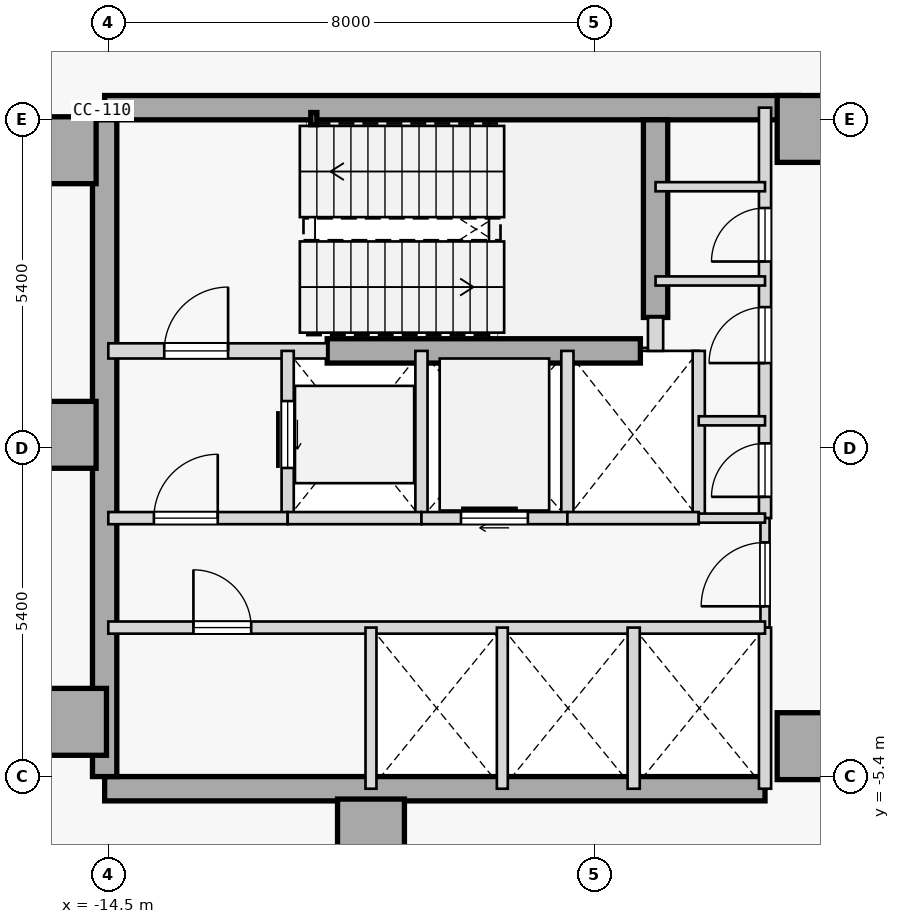
"""IFC4 building model, lengths in metres.
Left out: names, types, materials, properties, quantities, classifications, styles, units other than length and angle.
Written with IfcOpenShell. Run it as: python <this file> out.ifc"""

import sys

from ifc_helpers import new_model, si_unit, direction, frame, frame_2d, origin, origin_2d, place, context, subcontext, project, spatial, rectangle, hollow_rectangle, extrude, element, fill, save


model = new_model("IFC4")
c1 = context("Model", 3, precision=1e-05, world=origin(), true_north=direction((0.0, 1.0)))
c2 = subcontext(c1, "Body", "Model", "MODEL_VIEW")
j1 = project(units=[si_unit("LENGTHUNIT", "METRE"), si_unit("PLANEANGLEUNIT", "RADIAN")], contexts=[c1])
p1 = place(None, origin())
s1 = spatial("IfcSite", under=j1, at=p1, CompositionType="ELEMENT")
p2 = place(p1, origin())
s2 = spatial("IfcBuilding", under=s1, at=p2, CompositionType="ELEMENT")
p3 = place(p2, frame((0.0, 0.0, 202.4)))
s3 = spatial("IfcBuildingStorey", under=s2, at=p3, CompositionType="ELEMENT", Elevation=202.4)
for number, where, z_axis, x_axis in (
    (1, (-15.25, 4.9, 0.0), (0.0, 0.0, 1.0), (1.0, 0.0, 0.0)),
    (2, (-15.25, 0.22, 0.0), (0.0, 0.0, 1.0), (1.0, 0.0, 0.0)),
    (3, (-15.08, -4.5, 0.0), (0.0, 0.0, 1.0), (1.0, 0.0, 0.0)),
    (4, (-10.18, -6.32, 0.0), (0.0, 0.0, 1.0), (1.0, 0.0, 0.0)),
    (5, (-2.95, -4.9, 0.0), (0.0, 0.0, 1.0), (1.0, 0.0, 0.0)),
    (6, (-2.95, 5.25, 0.0), (0.0, 0.0, 1.0), (1.0, 0.0, 0.0)),
):
    element("IfcColumn", number, at=place(p3, frame(where, z_axis=z_axis, x_axis=x_axis)), inside=s3, PredefinedType="COLUMN", context=c2, shape_type="SweptSolid", body=[
        extrude(rectangle(XDim=1.1, YDim=1.1, at=origin_2d()), origin(), (0.0, 0.0, 1.0), 4.4),
    ])
p4 = place(p3, frame((-14.56, 5.6, 0.0), z_axis=(0.0, 0.0, 1.0), x_axis=(1.0, 0.0, 0.0)))
e7 = element("IfcWall", 7, at=p4, inside=s3, PredefinedType="SHEAR", context=c2, shape_type="SweptSolid", body=[
    extrude(rectangle(XDim=11.41, YDim=0.4, at=frame_2d((5.705, 0.0))), origin(), (0.0, 0.0, 1.0), 4.15),
])
p5 = place(p3, frame((-14.56, -5.6, 0.0), z_axis=(0.0, 0.0, 1.0), x_axis=(1.0, 0.0, 0.0)))
e8 = element("IfcWall", 8, at=p5, inside=s3, PredefinedType="SHEAR", context=c2, shape_type="SweptSolid", body=[
    extrude(rectangle(XDim=10.86, YDim=0.4, at=frame_2d((5.43, 0.0))), origin(), (0.0, 0.0, 1.0), 4.15),
])
p6 = place(p3, frame((-14.56, -5.4, 0.0), z_axis=(0.0, 0.0, 1.0), x_axis=(0.0, 1.0, 0.0)))
e9 = element("IfcWall", 9, at=p6, inside=s3, PredefinedType="SHEAR", context=c2, shape_type="SweptSolid", body=[
    extrude(rectangle(XDim=10.8, YDim=0.4, at=frame_2d((5.4, 0.0))), origin(), (0.0, 0.0, 1.0), 4.15),
])
p7 = place(p3, frame((-5.5, 2.15, 0.0), z_axis=(0.0, 0.0, 1.0), x_axis=(0.0, 1.0, 0.0)))
e10 = element("IfcWall", 10, at=p7, inside=s3, PredefinedType="SHEAR", context=c2, shape_type="SweptSolid", body=[
    extrude(rectangle(XDim=3.25, YDim=0.4, at=frame_2d((1.625, 0.0))), origin(), (0.0, 0.0, 1.0), 4.15),
])
p8 = place(p3, frame((-10.9, 1.6, 0.0), z_axis=(0.0, 0.0, 1.0), x_axis=(1.0, 0.0, 0.0)))
e11 = element("IfcWall", 11, at=p8, inside=s3, PredefinedType="SHEAR", context=c2, shape_type="SweptSolid", body=[
    extrude(rectangle(XDim=5.15, YDim=0.4, at=frame_2d((2.575, 0.0))), origin(), (0.0, 0.0, 1.0), 4.15),
])
p9 = place(p3, frame((-11.12, 5.42, 0.0), z_axis=(0.0, 0.0, 1.0), x_axis=(1.0, 0.0, 0.0)))
e12 = element("IfcColumn", 12, at=p9, inside=s3, PredefinedType="COLUMN", context=c2, shape_type="SweptSolid", body=[
    extrude(hollow_rectangle(XDim=0.1, YDim=0.2, WallThickness=0.008, at=origin_2d()), origin(), (0.0, 0.0, 1.0), 4.4),
])
p10 = place(p3, frame((-14.5, 1.6, 0.0), z_axis=(0.0, 0.0, 1.0), x_axis=(1.0, 0.0, 0.0)))
e13 = element("IfcWall", 13, at=p10, inside=s3, PredefinedType="STANDARD", context=c2, shape_type="SweptSolid", body=[
    extrude(rectangle(XDim=3.6, YDim=0.25, at=frame_2d((1.8, 0.0))), origin(), (0.0, 0.0, 1.0), 4.15),
])
p11 = place(p10, frame((0.92, 0.0, 0.0)))
e14 = element("IfcOpeningElement", 14, at=p11, cuts=e13, PredefinedType="OPENING", context=c2, shape_type="SweptSolid", body=[
    extrude(rectangle(XDim=1.05, YDim=2.15, at=frame_2d((0.525, 1.075))), frame((0.0, 0.135, 0.0), z_axis=(0.0, -1.0, 0.0), x_axis=(1.0, 0.0, 0.0)), (0.0, 0.0, 1.0), 0.27),
])
p12 = place(p3, frame((-5.5, 1.6, 0.0), z_axis=(0.0, 0.0, 1.0), x_axis=(0.0, 1.0, 0.0)))
e15 = element("IfcWall", 15, at=p12, inside=s3, PredefinedType="STANDARD", context=c2, shape_type="SweptSolid", body=[
    extrude(rectangle(XDim=0.55, YDim=0.25, at=frame_2d((0.275, 0.0))), origin(), (0.0, 0.0, 1.0), 4.15),
])
p13 = place(p3, frame((-3.7, -1.15, 0.0), z_axis=(0.0, 0.0, 1.0), x_axis=(0.0, 1.0, 0.0)))
e16 = element("IfcWall", 16, at=p13, inside=s3, PredefinedType="STANDARD", context=c2, shape_type="SweptSolid", body=[
    extrude(rectangle(XDim=6.75, YDim=0.2, at=frame_2d((3.375, 0.0))), origin(), (0.0, 0.0, 1.0), 4.15),
])
p14 = place(p13, frame((0.35, 0.0, 0.0)))
e17 = element("IfcOpeningElement", 17, at=p14, cuts=e16, PredefinedType="OPENING", context=c2, shape_type="SweptSolid", body=[
    extrude(rectangle(XDim=0.88, YDim=2.15, at=frame_2d((0.44, 1.075))), frame((0.0, 0.11, 0.0), z_axis=(0.0, -1.0, 0.0), x_axis=(1.0, 0.0, 0.0)), (0.0, 0.0, 1.0), 0.22),
])
p15 = place(p13, frame((2.55, 0.0, 0.0)))
e18 = element("IfcOpeningElement", 18, at=p15, cuts=e16, PredefinedType="OPENING", context=c2, shape_type="SweptSolid", body=[
    extrude(rectangle(XDim=0.92, YDim=2.15, at=frame_2d((0.46, 1.075))), frame((0.0, 0.11, 0.0), z_axis=(0.0, -1.0, 0.0), x_axis=(1.0, 0.0, 0.0)), (0.0, 0.0, 1.0), 0.22),
])
p16 = place(p13, frame((4.22, 0.0, 0.0)))
e19 = element("IfcOpeningElement", 19, at=p16, cuts=e16, PredefinedType="OPENING", context=c2, shape_type="SweptSolid", body=[
    extrude(rectangle(XDim=0.88, YDim=2.15, at=frame_2d((0.44, 1.075))), frame((0.0, 0.11, 0.0), z_axis=(0.0, -1.0, 0.0), x_axis=(1.0, 0.0, 0.0)), (0.0, 0.0, 1.0), 0.22),
])
p17 = place(p3, frame((-3.7, -2.95, 0.0), z_axis=(0.0, 0.0, 1.0), x_axis=(0.0, 1.0, 0.0)))
e20 = element("IfcWall", 20, at=p17, inside=s3, PredefinedType="PARTITIONING", context=c2, shape_type="SweptSolid", body=[
    extrude(rectangle(XDim=1.8, YDim=0.15, at=frame_2d((0.9, 0.0))), origin(), (0.0, 0.0, 1.0), 4.15),
])
p18 = place(p17, frame((0.35, 0.0, 0.0)))
e21 = element("IfcOpeningElement", 21, at=p18, cuts=e20, PredefinedType="OPENING", context=c2, shape_type="SweptSolid", body=[
    extrude(rectangle(XDim=1.05, YDim=2.18, at=frame_2d((0.525, 1.09))), frame((0.0, 0.085, 0.0), z_axis=(0.0, -1.0, 0.0), x_axis=(1.0, 0.0, 0.0)), (0.0, 0.0, 1.0), 0.17),
])
p19 = place(p3, frame((-3.7, -5.6, 0.0), z_axis=(0.0, 0.0, 1.0), x_axis=(0.0, 1.0, 0.0)))
e22 = element("IfcWall", 22, at=p19, inside=s3, PredefinedType="STANDARD", context=c2, shape_type="SweptSolid", body=[
    extrude(rectangle(XDim=2.65, YDim=0.2, at=frame_2d((1.325, 0.0))), origin(), (0.0, 0.0, 1.0), 4.15),
])
p20 = place(p3, frame((-11.55, -1.15, 0.0), z_axis=(0.0, 0.0, 1.0), x_axis=(0.0, 1.0, 0.0)))
e23 = element("IfcWall", 23, at=p20, inside=s3, PredefinedType="STANDARD", context=c2, shape_type="SweptSolid", body=[
    extrude(rectangle(XDim=2.75, YDim=0.2, at=frame_2d((1.375, 0.0))), origin(), (0.0, 0.0, 1.0), 4.15),
])
p21 = place(p20, frame((0.825, 0.0, 0.0)))
e24 = element("IfcOpeningElement", 24, at=p21, cuts=e23, PredefinedType="OPENING", context=c2, shape_type="SweptSolid", body=[
    extrude(rectangle(XDim=1.1, YDim=2.15, at=frame_2d((0.55, 1.075))), frame((0.0, 0.11, 0.0), z_axis=(0.0, -1.0, 0.0), x_axis=(1.0, 0.0, 0.0)), (0.0, 0.0, 1.0), 0.22),
])
p22 = place(p3, frame((-9.35, -1.15, 0.0), z_axis=(0.0, 0.0, 1.0), x_axis=(0.0, 1.0, 0.0)))
e25 = element("IfcWall", 25, at=p22, inside=s3, PredefinedType="STANDARD", context=c2, shape_type="SweptSolid", body=[
    extrude(rectangle(XDim=2.75, YDim=0.2, at=frame_2d((1.375, 0.0))), origin(), (0.0, 0.0, 1.0), 4.15),
])
p23 = place(p3, frame((-14.5, -1.15, 0.0), z_axis=(0.0, 0.0, 1.0), x_axis=(1.0, 0.0, 0.0)))
e26 = element("IfcWall", 26, at=p23, inside=s3, PredefinedType="STANDARD", context=c2, shape_type="SweptSolid", body=[
    extrude(rectangle(XDim=2.95, YDim=0.2, at=frame_2d((1.475, 0.0))), origin(), (0.0, 0.0, 1.0), 4.15),
])
p24 = place(p23, frame((0.75, 0.0, 0.0)))
e27 = element("IfcOpeningElement", 27, at=p24, cuts=e26, PredefinedType="OPENING", context=c2, shape_type="SweptSolid", body=[
    extrude(rectangle(XDim=1.05, YDim=2.18, at=frame_2d((0.525, 1.09))), frame((0.0, 0.11, 0.0), z_axis=(0.0, -1.0, 0.0), x_axis=(1.0, 0.0, 0.0)), (0.0, 0.0, 1.0), 0.22),
])
p25 = place(p3, frame((-11.55, -1.15, 0.0), z_axis=(0.0, 0.0, 1.0), x_axis=(1.0, 0.0, 0.0)))
e28 = element("IfcWall", 28, at=p25, inside=s3, PredefinedType="STANDARD", context=c2, shape_type="SweptSolid", body=[
    extrude(rectangle(XDim=2.2, YDim=0.2, at=frame_2d((1.1, 0.0))), origin(), (0.0, 0.0, 1.0), 4.15),
])
p26 = place(p3, frame((-6.95, -1.15, 0.0), z_axis=(0.0, 0.0, 1.0), x_axis=(0.0, 1.0, 0.0)))
e29 = element("IfcWall", 29, at=p26, inside=s3, PredefinedType="STANDARD", context=c2, shape_type="SweptSolid", body=[
    extrude(rectangle(XDim=2.75, YDim=0.2, at=frame_2d((1.375, 0.0))), origin(), (0.0, 0.0, 1.0), 4.15),
])
p27 = place(p3, frame((-9.35, -1.15, 0.0), z_axis=(0.0, 0.0, 1.0), x_axis=(1.0, 0.0, 0.0)))
e30 = element("IfcWall", 30, at=p27, inside=s3, PredefinedType="STANDARD", context=c2, shape_type="SweptSolid", body=[
    extrude(rectangle(XDim=2.4, YDim=0.2, at=frame_2d((1.2, 0.0))), origin(), (0.0, 0.0, 1.0), 4.15),
])
p28 = place(p27, frame((0.65, 0.0, 0.0)))
e31 = element("IfcOpeningElement", 31, at=p28, cuts=e30, PredefinedType="OPENING", context=c2, shape_type="SweptSolid", body=[
    extrude(rectangle(XDim=1.1, YDim=2.15, at=frame_2d((0.55, 1.075))), frame((0.0, 0.11, 0.0), z_axis=(0.0, -1.0, 0.0), x_axis=(1.0, 0.0, 0.0)), (0.0, 0.0, 1.0), 0.22),
])
p29 = place(p3, frame((-4.79, -1.15, 0.0), z_axis=(0.0, 0.0, 1.0), x_axis=(0.0, 1.0, 0.0)))
e32 = element("IfcWall", 32, at=p29, inside=s3, PredefinedType="STANDARD", context=c2, shape_type="SweptSolid", body=[
    extrude(rectangle(XDim=2.75, YDim=0.2, at=frame_2d((1.375, 0.0))), origin(), (0.0, 0.0, 1.0), 4.15),
])
p30 = place(p3, frame((-6.95, -1.15, 0.0), z_axis=(0.0, 0.0, 1.0), x_axis=(1.0, 0.0, 0.0)))
e33 = element("IfcWall", 33, at=p30, inside=s3, PredefinedType="STANDARD", context=c2, shape_type="SweptSolid", body=[
    extrude(rectangle(XDim=2.16, YDim=0.2, at=frame_2d((1.08, 0.0))), origin(), (0.0, 0.0, 1.0), 4.15),
])
p31 = place(p3, frame((-4.79, -1.15, 0.0), z_axis=(0.0, 0.0, 1.0), x_axis=(1.0, 0.0, 0.0)))
e34 = element("IfcWall", 34, at=p31, inside=s3, PredefinedType="PARTITIONING", context=c2, shape_type="SweptSolid", body=[
    extrude(rectangle(XDim=1.09, YDim=0.15, at=frame_2d((0.545, 0.0))), origin(), (0.0, 0.0, 1.0), 4.15),
])
p32 = place(p3, frame((-14.5, -2.95, 0.0), z_axis=(0.0, 0.0, 1.0), x_axis=(1.0, 0.0, 0.0)))
e35 = element("IfcWall", 35, at=p32, inside=s3, PredefinedType="STANDARD", context=c2, shape_type="SweptSolid", body=[
    extrude(rectangle(XDim=10.8, YDim=0.2, at=frame_2d((5.4, 0.0))), origin(), (0.0, 0.0, 1.0), 4.15),
])
p33 = place(p32, frame((1.4, 0.0, 0.0)))
e36 = element("IfcOpeningElement", 36, at=p33, cuts=e35, PredefinedType="OPENING", context=c2, shape_type="SweptSolid", body=[
    extrude(rectangle(XDim=0.95, YDim=2.15, at=frame_2d((0.475, 1.075))), frame((0.0, 0.11, 0.0), z_axis=(0.0, -1.0, 0.0), x_axis=(1.0, 0.0, 0.0)), (0.0, 0.0, 1.0), 0.22),
])
p34 = place(p3, frame((-5.86, -5.6, 0.0), z_axis=(0.0, 0.0, 1.0), x_axis=(0.0, 1.0, 0.0)))
e37 = element("IfcWall", 37, at=p34, inside=s3, PredefinedType="STANDARD", context=c2, shape_type="SweptSolid", body=[
    extrude(rectangle(XDim=2.65, YDim=0.2, at=frame_2d((1.325, 0.0))), origin(), (0.0, 0.0, 1.0), 4.15),
])
for number, where, z_axis, x_axis in (
    (38, (-10.18, -5.6, 0.0), (0.0, 0.0, 1.0), (0.0, 1.0, 0.0)),
    (39, (-8.02, -5.6, 0.0), (0.0, 0.0, 1.0), (0.0, 1.0, 0.0)),
):
    element("IfcWall", number, at=place(p3, frame(where, z_axis=z_axis, x_axis=x_axis)), inside=s3, PredefinedType="STANDARD", context=c2, shape_type="SweptSolid", body=[
        extrude(rectangle(XDim=2.65, YDim=0.18, at=frame_2d((1.325, 0.0))), origin(), (0.0, 0.0, 1.0), 4.15),
    ])
p35 = place(p3, frame((-5.5, 4.3, 0.0), z_axis=(0.0, 0.0, 1.0), x_axis=(1.0, 0.0, 0.0)))
e40 = element("IfcWall", 40, at=p35, inside=s3, PredefinedType="PARTITIONING", context=c2, shape_type="SweptSolid", body=[
    extrude(rectangle(XDim=1.8, YDim=0.15, at=frame_2d((0.9, 0.0))), origin(), (0.0, 0.0, 1.0), 4.15),
])
p36 = place(p3, frame((-4.79, 0.45, 0.0), z_axis=(0.0, 0.0, 1.0), x_axis=(1.0, 0.0, 0.0)))
e41 = element("IfcWall", 41, at=p36, inside=s3, PredefinedType="PARTITIONING", context=c2, shape_type="SweptSolid", body=[
    extrude(rectangle(XDim=1.09, YDim=0.15, at=frame_2d((0.545, 0.0))), origin(), (0.0, 0.0, 1.0), 4.15),
])
p37 = place(p3, frame((-5.5, 2.75, 0.0), z_axis=(0.0, 0.0, 1.0), x_axis=(1.0, 0.0, 0.0)))
e42 = element("IfcWall", 42, at=p37, inside=s3, PredefinedType="PARTITIONING", context=c2, shape_type="SweptSolid", body=[
    extrude(rectangle(XDim=1.8, YDim=0.15, at=frame_2d((0.9, 0.0))), origin(), (0.0, 0.0, 1.0), 4.15),
])
p38 = place(p11, origin())
e43 = element("IfcDoor", 43, at=p38, inside=s3, OperationType="SINGLE_SWING_RIGHT", PredefinedType="DOOR", context=c2, shape_type="SweptSolid", body=[
    extrude(rectangle(XDim=1.05, YDim=2.15, at=frame_2d((0.525, 1.075))), frame((0.0, 0.025, 0.0), z_axis=(0.0, -1.0, 0.0), x_axis=(1.0, 0.0, 0.0)), (0.0, 0.0, 1.0), 0.05),
])
fill(e14, e43)
p39 = place(p24, origin())
e44 = element("IfcDoor", 44, at=p39, inside=s3, OperationType="SINGLE_SWING_RIGHT", PredefinedType="DOOR", context=c2, shape_type="SweptSolid", body=[
    extrude(rectangle(XDim=1.05, YDim=2.18, at=frame_2d((0.525, 1.09))), frame((0.0, 0.025, 0.0), z_axis=(0.0, -1.0, 0.0), x_axis=(1.0, 0.0, 0.0)), (0.0, 0.0, 1.0), 0.05),
])
fill(e27, e44)
p40 = place(p18, origin())
e45 = element("IfcDoor", 45, at=p40, inside=s3, OperationType="SINGLE_SWING_LEFT", PredefinedType="DOOR", context=c2, shape_type="SweptSolid", body=[
    extrude(rectangle(XDim=1.05, YDim=2.18, at=frame_2d((0.525, 1.09))), frame((0.0, 0.025, 0.0), z_axis=(0.0, -1.0, 0.0), x_axis=(1.0, 0.0, 0.0)), (0.0, 0.0, 1.0), 0.05),
])
fill(e21, e45)
p41 = place(p21, origin())
e46 = element("IfcDoor", 46, at=p41, inside=s3, OperationType="SLIDING_TO_RIGHT", PredefinedType="DOOR", context=c2, shape_type="SweptSolid", body=[
    extrude(rectangle(XDim=1.1, YDim=2.15, at=frame_2d((0.55, 1.075))), frame((0.0, 0.025, 0.0), z_axis=(0.0, -1.0, 0.0), x_axis=(1.0, 0.0, 0.0)), (0.0, 0.0, 1.0), 0.05),
])
fill(e24, e46)
p42 = place(p28, origin())
e47 = element("IfcDoor", 47, at=p42, inside=s3, OperationType="SLIDING_TO_RIGHT", PredefinedType="DOOR", context=c2, shape_type="SweptSolid", body=[
    extrude(rectangle(XDim=1.1, YDim=2.15, at=frame_2d((0.55, 1.075))), frame((0.0, 0.025, 0.0), z_axis=(0.0, -1.0, 0.0), x_axis=(1.0, 0.0, 0.0)), (0.0, 0.0, 1.0), 0.05),
])
fill(e31, e47)
p43 = place(p33, origin())
e48 = element("IfcDoor", 48, at=p43, inside=s3, OperationType="SINGLE_SWING_LEFT", PredefinedType="DOOR", context=c2, shape_type="SweptSolid", body=[
    extrude(rectangle(XDim=0.95, YDim=2.15, at=frame_2d((0.475, 1.075))), frame((0.0, 0.025, 0.0), z_axis=(0.0, -1.0, 0.0), x_axis=(1.0, 0.0, 0.0)), (0.0, 0.0, 1.0), 0.05),
])
fill(e36, e48)
p44 = place(p14, origin())
e49 = element("IfcDoor", 49, at=p44, inside=s3, OperationType="SINGLE_SWING_LEFT", PredefinedType="DOOR", context=c2, shape_type="SweptSolid", body=[
    extrude(rectangle(XDim=0.88, YDim=2.15, at=frame_2d((0.44, 1.075))), frame((0.0, 0.025, 0.0), z_axis=(0.0, -1.0, 0.0), x_axis=(1.0, 0.0, 0.0)), (0.0, 0.0, 1.0), 0.05),
])
fill(e17, e49)
p45 = place(p15, origin())
e50 = element("IfcDoor", 50, at=p45, inside=s3, OperationType="SINGLE_SWING_LEFT", PredefinedType="DOOR", context=c2, shape_type="SweptSolid", body=[
    extrude(rectangle(XDim=0.92, YDim=2.15, at=frame_2d((0.46, 1.075))), frame((0.0, 0.025, 0.0), z_axis=(0.0, -1.0, 0.0), x_axis=(1.0, 0.0, 0.0)), (0.0, 0.0, 1.0), 0.05),
])
fill(e18, e50)
p46 = place(p16, origin())
e51 = element("IfcDoor", 51, at=p46, inside=s3, OperationType="SINGLE_SWING_LEFT", PredefinedType="DOOR", context=c2, shape_type="SweptSolid", body=[
    extrude(rectangle(XDim=0.88, YDim=2.15, at=frame_2d((0.44, 1.075))), frame((0.0, 0.025, 0.0), z_axis=(0.0, -1.0, 0.0), x_axis=(1.0, 0.0, 0.0)), (0.0, 0.0, 1.0), 0.05),
])
fill(e19, e51)
save(model, sys.argv[1])
